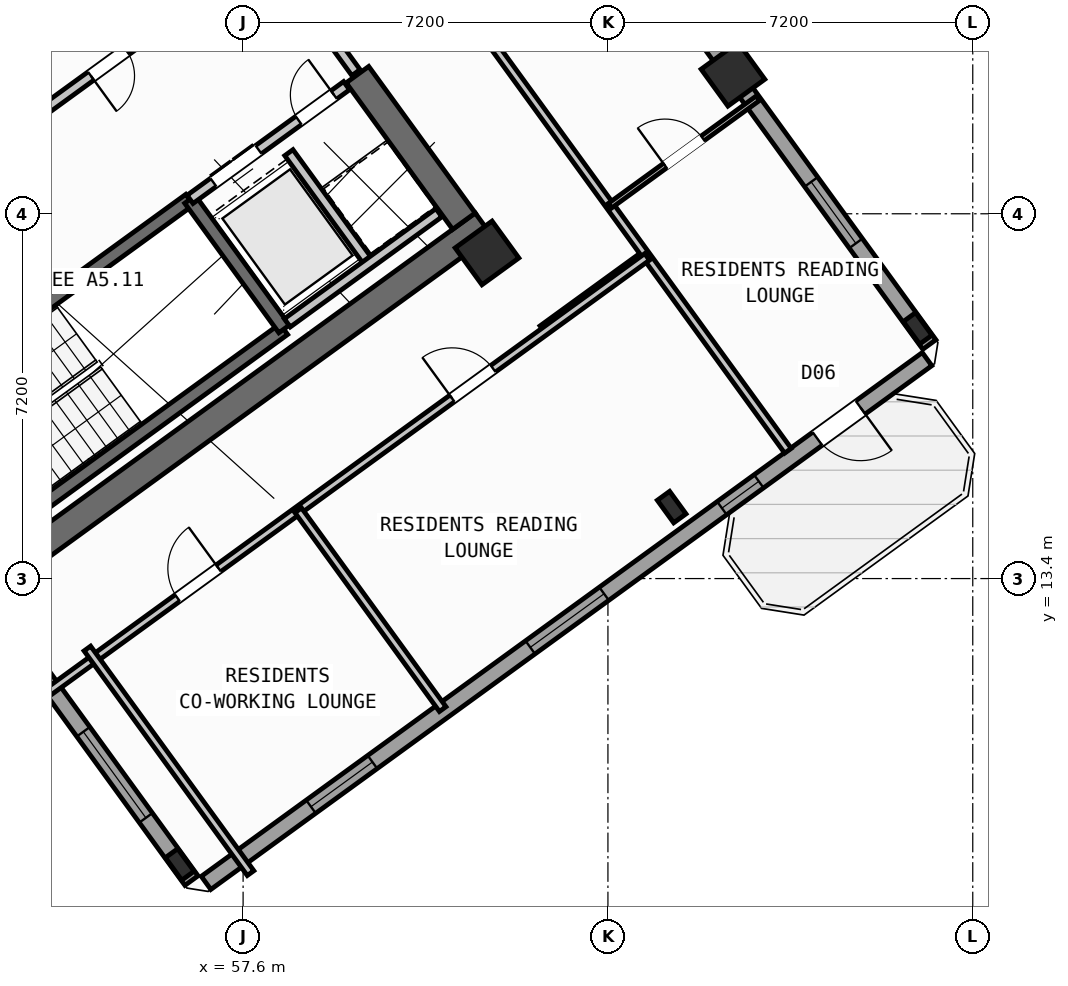
"""IFC4 building model, lengths in metres.
Left out: names, types, materials, properties, quantities, classifications, styles, units other than length and angle.
Written with IfcOpenShell. Run it as: python <this file> out.ifc"""

import sys

from ifc_helpers import new_model, si_unit, direction, frame, frame_2d, origin, origin_2d, place, context, subcontext, project, spatial, rectangle, hollow_rectangle, i_section, extrude, source, transform, mapped, element, fill, save


model = new_model("IFC4")
c1 = context("Model", 3, precision=1e-05, world=origin(), true_north=direction((0.0, 1.0)))
c2 = subcontext(c1, "Body", "Model", "MODEL_VIEW")
j1 = project(units=[si_unit("LENGTHUNIT", "METRE"), si_unit("PLANEANGLEUNIT", "RADIAN")], contexts=[c1])
p1 = place(None, origin())
s1 = spatial("IfcSite", under=j1, at=p1, CompositionType="ELEMENT")
p2 = place(p1, origin())
s2 = spatial("IfcBuilding", under=s1, at=p2, CompositionType="ELEMENT")
p3 = place(p2, frame((0.0, 0.0, 155.1)))
s3 = spatial("IfcBuildingStorey", under=s2, at=p3, CompositionType="ELEMENT", Elevation=155.1)
p4 = place(p3, frame((52.359, 13.14, 0.0), z_axis=(0.0, 0.0, 1.0), x_axis=(0.809014896919, 0.587788139183, 0.0)))
e1 = element("IfcWall", 1, at=p4, inside=s3, PredefinedType="SHEAR", context=c2, shape_type="SweptSolid", body=[
    extrude(rectangle(XDim=12.34, YDim=0.55, at=frame_2d((6.17, 0.0))), origin(), (0.0, 0.0, 1.0), 3.35),
])
p5 = place(p3, frame((61.958, 20.454, 0.0), z_axis=(0.0, 0.0, 1.0), x_axis=(-0.587802113096, 0.809004744015, 0.0)))
e2 = element("IfcWall", 2, at=p5, inside=s3, PredefinedType="SHEAR", context=c2, shape_type="SweptSolid", body=[
    extrude(rectangle(XDim=3.575, YDim=0.55, at=frame_2d((1.788, 0.0))), origin(), (0.0, 0.0, 1.0), 3.35),
])
m1 = source(origin(), c2, "Body", "SweptSolid", [
    extrude(i_section(OverallWidth=0.3, OverallDepth=0.55, WebThickness=0.015, FlangeThickness=0.029, at=origin_2d()), origin(), (0.0, 0.0, 1.0), 3.6),
])
for number, where, z_axis, x_axis in (
    (3, (56.35, 7.758, 0.0), (0.0, 0.0, 1.0), (0.809, 0.588, 0.0)),
    (4, (66.058, 14.811, 0.0), (0.0, 0.0, 1.0), (0.809, 0.588, 0.0)),
):
    element("IfcColumn", number, at=place(p3, frame(where, z_axis=z_axis, x_axis=x_axis)), inside=s3, PredefinedType="COLUMN", context=c2, shape_type="MappedRepresentation", body=[
        mapped(m1, transform((0.0, 0.0, 0.0), scale=1.0)),
    ])
m2 = source(origin(), c2, "Body", "SweptSolid", [
    extrude(hollow_rectangle(XDim=0.9, YDim=0.9, WallThickness=0.036, at=origin_2d()), origin(), (0.0, 0.0, 1.0), 3.6),
])
p6 = place(p3, frame((62.414, 19.827, 0.0), z_axis=(0.0, 0.0, 1.0), x_axis=(0.809016994375, 0.587785252292, 0.0)))
e5 = element("IfcColumn", 5, at=p6, inside=s3, PredefinedType="COLUMN", context=c2, shape_type="MappedRepresentation", body=[
    mapped(m2, transform((0.0, 0.0, 0.0), scale=1.0)),
])
p7 = place(p3, frame((70.912, 18.338, 0.0), z_axis=(0.0, 0.0, 1.0), x_axis=(0.809016994375, 0.587785252292, 0.0)))
e6 = element("IfcColumn", 6, at=p7, inside=s3, PredefinedType="COLUMN", context=c2, shape_type="MappedRepresentation", body=[
    mapped(m1, transform((0.0, 0.0, 0.0), scale=1.0)),
])
p8 = place(p3, frame((67.268, 23.354, 0.0), z_axis=(0.0, 0.0, 1.0), x_axis=(0.809016994375, 0.587785252292, 0.0)))
e7 = element("IfcColumn", 7, at=p8, inside=s3, PredefinedType="COLUMN", context=c2, shape_type="MappedRepresentation", body=[
    mapped(m2, transform((0.0, 0.0, 0.0), scale=1.0)),
])
p9 = place(p3, frame((58.455, 35.484, 0.0), z_axis=(0.0, 0.0, 1.0), x_axis=(0.587783625747, -0.809018176127, 0.0)))
e8 = element("IfcWall", 8, at=p9, inside=s3, PredefinedType="STANDARD", context=c2, shape_type="SweptSolid", body=[
    extrude(rectangle(XDim=21.587, YDim=0.32, at=frame_2d((10.794, 0.0))), origin(), (0.0, 0.0, 1.0), 2.775),
])
p10 = place(p9, frame((1.504, 0.0, 0.85)))
e9 = element("IfcOpeningElement", 9, at=p10, cuts=e8, PredefinedType="OPENING", context=c2, shape_type="SweptSolid", body=[
    extrude(rectangle(XDim=1.8, YDim=1.5, at=frame_2d((0.9, 0.75))), frame((0.0, 0.17, 0.0), z_axis=(0.0, -1.0, 0.0), x_axis=(1.0, 0.0, 0.0)), (0.0, 0.0, 1.0), 0.34),
])
p11 = place(p9, frame((10.444, 0.0, 0.85)))
e10 = element("IfcOpeningElement", 10, at=p11, cuts=e8, PredefinedType="OPENING", context=c2, shape_type="SweptSolid", body=[
    extrude(rectangle(XDim=1.8, YDim=1.5, at=frame_2d((0.9, 0.75))), frame((0.0, 0.17, 0.0), z_axis=(0.0, -1.0, 0.0), x_axis=(1.0, 0.0, 0.0)), (0.0, 0.0, 1.0), 0.34),
])
p12 = place(p9, frame((17.62, 0.0, 0.85)))
e11 = element("IfcOpeningElement", 11, at=p12, cuts=e8, PredefinedType="OPENING", context=c2, shape_type="SweptSolid", body=[
    extrude(rectangle(XDim=1.5, YDim=1.5, at=frame_2d((0.75, 0.75))), frame((0.0, 0.17, 0.0), z_axis=(0.0, -1.0, 0.0), x_axis=(1.0, 0.0, 0.0)), (0.0, 0.0, 1.0), 0.34),
])
p13 = place(p3, frame((71.098, 17.731, 0.0), z_axis=(0.0, 0.0, 1.0), x_axis=(-0.809021120468, -0.587779573171, 0.0)))
e12 = element("IfcWall", 12, at=p13, inside=s3, PredefinedType="STANDARD", context=c2, shape_type="SweptSolid", body=[
    extrude(rectangle(XDim=17.588, YDim=0.32, at=frame_2d((8.794, 0.0))), origin(), (0.0, 0.0, 1.0), 3.35),
])
p14 = place(p13, frame((1.624, 0.0, 0.0)))
e13 = element("IfcOpeningElement", 13, at=p14, cuts=e12, PredefinedType="OPENING", context=c2, shape_type="SweptSolid", body=[
    extrude(rectangle(XDim=1.05, YDim=2.15, at=frame_2d((0.525, 1.075))), frame((0.0, 0.17, 0.0), z_axis=(0.0, -1.0, 0.0), x_axis=(1.0, 0.0, 0.0)), (0.0, 0.0, 1.0), 0.34),
])
p15 = place(p13, frame((4.104, 0.0, 1.0)))
e14 = element("IfcOpeningElement", 14, at=p15, cuts=e12, PredefinedType="OPENING", context=c2, shape_type="SweptSolid", body=[
    extrude(rectangle(XDim=0.9, YDim=1.25, at=frame_2d((0.45, 0.625))), frame((0.0, 0.17, 0.0), z_axis=(0.0, -1.0, 0.0), x_axis=(1.0, 0.0, 0.0)), (0.0, 0.0, 1.0), 0.34),
])
p16 = place(p13, frame((7.879, 0.0, 0.85)))
e15 = element("IfcOpeningElement", 15, at=p16, cuts=e12, PredefinedType="OPENING", context=c2, shape_type="SweptSolid", body=[
    extrude(rectangle(XDim=1.8, YDim=1.5, at=frame_2d((0.9, 0.75))), frame((0.0, 0.17, 0.0), z_axis=(0.0, -1.0, 0.0), x_axis=(1.0, 0.0, 0.0)), (0.0, 0.0, 1.0), 0.34),
])
p17 = place(p13, frame((13.529, 0.0, 0.85)))
e16 = element("IfcOpeningElement", 16, at=p17, cuts=e12, PredefinedType="OPENING", context=c2, shape_type="SweptSolid", body=[
    extrude(rectangle(XDim=1.5, YDim=1.5, at=frame_2d((0.75, 0.75))), frame((0.0, 0.17, 0.0), z_axis=(0.0, -1.0, 0.0), x_axis=(1.0, 0.0, 0.0)), (0.0, 0.0, 1.0), 0.34),
])
p18 = place(p3, frame((56.581, 7.439, 0.0), z_axis=(0.0, 0.0, 1.0), x_axis=(-0.587771678454, 0.809026856172, 0.0)))
e17 = element("IfcWall", 17, at=p18, inside=s3, PredefinedType="STANDARD", context=c2, shape_type="SweptSolid", body=[
    extrude(rectangle(XDim=6.824, YDim=0.32, at=frame_2d((3.412, 0.0))), origin(), (0.0, 0.0, 1.0), 2.775),
])
p19 = place(p18, frame((1.531, 0.0, 0.8)))
e18 = element("IfcOpeningElement", 18, at=p19, cuts=e17, PredefinedType="OPENING", context=c2, shape_type="SweptSolid", body=[
    extrude(rectangle(XDim=2.1, YDim=1.55, at=frame_2d((1.05, 0.775))), frame((0.0, 0.17, 0.0), z_axis=(0.0, -1.0, 0.0), x_axis=(1.0, 0.0, 0.0)), (0.0, 0.0, 1.0), 0.34),
])
p20 = place(p3, frame((49.863, 23.44, 0.0), z_axis=(0.0, 0.0, 1.0), x_axis=(0.809003474932, 0.587803859759, 0.0)))
e19 = element("IfcWall", 19, at=p20, inside=s3, PredefinedType="SHEAR", context=c2, shape_type="SweptSolid", body=[
    extrude(rectangle(XDim=7.46, YDim=0.26, at=frame_2d((3.73, 0.0))), origin(), (0.0, 0.0, 1.0), 3.35),
])
p21 = place(p20, frame((0.36, 0.0, 0.0)))
e20 = element("IfcOpeningElement", 20, at=p21, cuts=e19, PredefinedType="OPENING", context=c2, shape_type="SweptSolid", body=[
    extrude(rectangle(XDim=0.86, YDim=2.05, at=frame_2d((0.43, 1.025))), frame((0.0, 0.14, 0.0), z_axis=(0.0, -1.0, 0.0), x_axis=(1.0, 0.0, 0.0)), (0.0, 0.0, 1.0), 0.28),
])
p22 = place(p3, frame((52.472, 14.013, 0.0), z_axis=(0.0, 0.0, 1.0), x_axis=(0.809028366311, 0.587769599847, 0.0)))
e21 = element("IfcWall", 21, at=p22, inside=s3, PredefinedType="SHEAR", context=c2, shape_type="SweptSolid", body=[
    extrude(rectangle(XDim=7.33, YDim=0.26, at=frame_2d((3.665, 0.0))), origin(), (0.0, 0.0, 1.0), 3.35),
])
p23 = place(p3, frame((50.615, 16.57, 0.0), z_axis=(0.0, 0.0, 1.0), x_axis=(0.809028366311, 0.587769599847, 0.0)))
e22 = element("IfcWall", 22, at=p23, inside=s3, PredefinedType="SHEAR", context=c2, shape_type="SweptSolid", body=[
    extrude(rectangle(XDim=7.33, YDim=0.26, at=frame_2d((3.665, 0.0))), origin(), (0.0, 0.0, 1.0), 3.35),
])
p24 = place(p23, frame((0.22, 0.0, 0.0)))
e23 = element("IfcOpeningElement", 23, at=p24, cuts=e22, PredefinedType="OPENING", context=c2, shape_type="SweptSolid", body=[
    extrude(rectangle(XDim=1.1, YDim=2.1, at=frame_2d((0.55, 1.05))), frame((0.0, 0.14, 0.0), z_axis=(0.0, -1.0, 0.0), x_axis=(1.0, 0.0, 0.0)), (0.0, 0.0, 1.0), 0.28),
])
p25 = place(p3, frame((58.41, 18.327, 0.0), z_axis=(0.0, 0.0, 1.0), x_axis=(-0.58776738483, 0.809029975545, 0.0)))
e24 = element("IfcWall", 24, at=p25, inside=s3, PredefinedType="SHEAR", context=c2, shape_type="SweptSolid", body=[
    extrude(rectangle(XDim=3.16, YDim=0.26, at=frame_2d((1.58, 0.0))), origin(), (0.0, 0.0, 1.0), 3.35),
])
p26 = place(p3, frame((56.553, 20.884, 0.0), z_axis=(0.0, 0.0, 1.0), x_axis=(0.809023564264, 0.58777620951, 0.0)))
e25 = element("IfcWall", 25, at=p26, inside=s3, PredefinedType="STANDARD", context=c2, shape_type="SweptSolid", body=[
    extrude(rectangle(XDim=3.818, YDim=0.2, at=frame_2d((1.909, 0.0))), origin(), (0.0, 0.0, 1.0), 3.34),
])
p27 = place(p26, frame((0.57, 0.0, 0.0)))
e26 = element("IfcOpeningElement", 26, at=p27, cuts=e25, PredefinedType="OPENING", context=c2, shape_type="SweptSolid", body=[
    extrude(rectangle(XDim=1.1, YDim=2.15, at=frame_2d((0.55, 1.075))), frame((0.0, 0.11, 0.0), z_axis=(0.0, -1.0, 0.0), x_axis=(1.0, 0.0, 0.0)), (0.0, 0.0, 1.0), 0.22),
])
p28 = place(p26, frame((2.65, 0.0, 0.0)))
e27 = element("IfcOpeningElement", 27, at=p28, cuts=e25, PredefinedType="OPENING", context=c2, shape_type="SweptSolid", body=[
    extrude(rectangle(XDim=0.86, YDim=2.05, at=frame_2d((0.43, 1.025))), frame((0.0, 0.11, 0.0), z_axis=(0.0, -1.0, 0.0), x_axis=(1.0, 0.0, 0.0)), (0.0, 0.0, 1.0), 0.22),
])
p29 = place(p3, frame((60.067, 19.655, 0.0), z_axis=(0.0, 0.0, 1.0), x_axis=(-0.587800520745, 0.809005900975, 0.0)))
e28 = element("IfcWall", 28, at=p29, inside=s3, PredefinedType="STANDARD", context=c2, shape_type="SweptSolid", body=[
    extrude(rectangle(XDim=2.66, YDim=0.2, at=frame_2d((1.33, 0.0))), origin(), (0.0, 0.0, 1.0), 3.34),
])
p30 = place(p3, frame((58.472, 18.447, 0.0), z_axis=(0.0, 0.0, 1.0), x_axis=(0.809018631237, 0.587782999339, 0.0)))
e29 = element("IfcWall", 29, at=p30, inside=s3, PredefinedType="STANDARD", context=c2, shape_type="SweptSolid", body=[
    extrude(rectangle(XDim=3.698, YDim=0.2, at=frame_2d((1.849, 0.0))), origin(), (0.0, 0.0, 1.0), 3.34),
])
p31 = place(p3, frame((53.425, 22.468, 0.0), z_axis=(0.0, 0.0, 1.0), x_axis=(0.809024377198, 0.587775090574, 0.0)))
e30 = element("IfcWall", 30, at=p31, inside=s3, PredefinedType="STANDARD", context=c2, shape_type="SweptSolid", body=[
    extrude(rectangle(XDim=5.418, YDim=0.2, at=frame_2d((2.709, 0.0))), origin(), (0.0, 0.0, 1.0), 3.34),
])
p32 = place(p31, frame((4.28, 0.0, 0.0)))
e31 = element("IfcOpeningElement", 31, at=p32, cuts=e30, PredefinedType="OPENING", context=c2, shape_type="SweptSolid", body=[
    extrude(rectangle(XDim=0.86, YDim=2.05, at=frame_2d((0.43, 1.025))), frame((0.0, 0.11, 0.0), z_axis=(0.0, -1.0, 0.0), x_axis=(1.0, 0.0, 0.0)), (0.0, 0.0, 1.0), 0.22),
])
p33 = place(p31, frame((1.45, 0.0, 0.0)))
e32 = element("IfcOpeningElement", 32, at=p33, cuts=e30, PredefinedType="OPENING", context=c2, shape_type="SweptSolid", body=[
    extrude(rectangle(XDim=0.86, YDim=2.05, at=frame_2d((0.43, 1.025))), frame((0.0, 0.11, 0.0), z_axis=(0.0, -1.0, 0.0), x_axis=(1.0, 0.0, 0.0)), (0.0, 0.0, 1.0), 0.22),
])
p34 = place(p3, frame((59.827, 23.386, 0.0), z_axis=(0.0, 0.0, 1.0), x_axis=(-0.587803840107, 0.809003489211, 0.0)))
e33 = element("IfcWall", 33, at=p34, inside=s3, PredefinedType="STANDARD", context=c2, shape_type="SweptSolid", body=[
    extrude(rectangle(XDim=2.96, YDim=0.2, at=frame_2d((1.48, 0.0))), origin(), (0.0, 0.0, 1.0), 3.34),
])
p35 = place(p34, frame((1.68, 0.0, 0.0)))
e34 = element("IfcOpeningElement", 34, at=p35, cuts=e33, PredefinedType="OPENING", context=c2, shape_type="SweptSolid", body=[
    extrude(rectangle(XDim=1.0, YDim=2.1, at=frame_2d((0.5, 1.05))), frame((0.0, 0.11, 0.0), z_axis=(0.0, -1.0, 0.0), x_axis=(1.0, 0.0, 0.0)), (0.0, 0.0, 1.0), 0.22),
])
p36 = place(p3, frame((63.507, 18.322, 0.0), z_axis=(0.0, 0.0, 1.0), x_axis=(0.809034604122, 0.587761013791, 0.0)))
e35 = element("IfcWall", 35, at=p36, inside=s3, PredefinedType="PARTITIONING", context=c2, shape_type="SweptSolid", body=[
    extrude(rectangle(XDim=2.51, YDim=0.16, at=frame_2d((1.255, 0.0))), origin(), (0.0, 0.0, 1.0), 3.34),
])
p37 = place(p3, frame((68.353, 15.922, 0.0), z_axis=(0.0, 0.0, 1.0), x_axis=(-0.587782002009, 0.809019355834, 0.0)))
e36 = element("IfcWall", 36, at=p37, inside=s3, PredefinedType="PARTITIONING", context=c2, shape_type="SweptSolid", body=[
    extrude(rectangle(XDim=15.35, YDim=0.16, at=frame_2d((7.675, 0.0))), origin(), (0.0, 0.0, 1.0), 3.34),
])
p38 = place(p3, frame((64.839, 20.759, 0.0), z_axis=(0.0, 0.0, 1.0), x_axis=(0.809013833588, 0.587789602718, 0.0)))
e37 = element("IfcWall", 37, at=p38, inside=s3, PredefinedType="PARTITIONING", context=c2, shape_type="SweptSolid", body=[
    extrude(rectangle(XDim=3.61, YDim=0.11, at=frame_2d((1.805, 0.0))), origin(), (0.0, 0.0, 1.0), 3.34),
])
p39 = place(p38, frame((1.345, 0.0, 0.0)))
e38 = element("IfcOpeningElement", 38, at=p39, cuts=e37, PredefinedType="OPENING", context=c2, shape_type="SweptSolid", body=[
    extrude(rectangle(XDim=0.92, YDim=2.08, at=frame_2d((0.46, 1.04))), frame((0.0, 0.065, 0.0), z_axis=(0.0, -1.0, 0.0), x_axis=(1.0, 0.0, 0.0)), (0.0, 0.0, 1.0), 0.13),
])
p40 = place(p3, frame((53.705, 11.126, 0.0), z_axis=(0.0, 0.0, 1.0), x_axis=(0.809014504436, 0.587788679384, 0.0)))
e39 = element("IfcWall", 39, at=p40, inside=s3, PredefinedType="PARTITIONING", context=c2, shape_type="SweptSolid", body=[
    extrude(rectangle(XDim=14.67, YDim=0.16, at=frame_2d((7.335, 0.0))), origin(), (0.0, 0.0, 1.0), 3.34),
])
p41 = place(p40, frame((3.215, 0.0, 0.0)))
e40 = element("IfcOpeningElement", 40, at=p41, cuts=e39, PredefinedType="OPENING", context=c2, shape_type="SweptSolid", body=[
    extrude(rectangle(XDim=1.0, YDim=2.1, at=frame_2d((0.5, 1.05))), frame((0.0, 0.09, 0.0), z_axis=(0.0, -1.0, 0.0), x_axis=(1.0, 0.0, 0.0)), (0.0, 0.0, 1.0), 0.18),
])
p42 = place(p40, frame((9.915, 0.0, 0.0)))
e41 = element("IfcOpeningElement", 41, at=p42, cuts=e39, PredefinedType="OPENING", context=c2, shape_type="SweptSolid", body=[
    extrude(rectangle(XDim=1.0, YDim=2.1, at=frame_2d((0.5, 1.05))), frame((0.0, 0.09, 0.0), z_axis=(0.0, -1.0, 0.0), x_axis=(1.0, 0.0, 0.0)), (0.0, 0.0, 1.0), 0.18),
])
p43 = place(p3, frame((57.747, 7.586, 0.0), z_axis=(0.0, 0.0, 1.0), x_axis=(-0.587784893399, 0.809017255126, 0.0)))
e42 = element("IfcWall", 42, at=p43, inside=s3, PredefinedType="PARTITIONING", context=c2, shape_type="SweptSolid", body=[
    extrude(rectangle(XDim=5.48, YDim=0.16, at=frame_2d((2.74, 0.0))), origin(), (0.0, 0.0, 1.0), 3.34),
])
p44 = place(p3, frame((61.539, 10.823, 0.0), z_axis=(0.0, 0.0, 1.0), x_axis=(-0.587785532001, 0.809016791155, 0.0)))
e43 = element("IfcWall", 43, at=p44, inside=s3, PredefinedType="PARTITIONING", context=c2, shape_type="SweptSolid", body=[
    extrude(rectangle(XDim=4.85, YDim=0.16, at=frame_2d((2.425, 0.0))), origin(), (0.0, 0.0, 1.0), 3.34),
])
m3 = source(origin(), c2, "Body", "SweptSolid", [
    extrude(rectangle(XDim=1.05, YDim=2.15, at=frame_2d((0.525, 1.075))), frame((0.0, 0.025, 0.0), z_axis=(0.0, -1.0, 0.0), x_axis=(1.0, 0.0, 0.0)), (0.0, 0.0, 1.0), 0.05),
])
p45 = place(p14, origin())
e44 = element("IfcDoor", 44, at=p45, inside=s3, OperationType="SINGLE_SWING_LEFT", PredefinedType="DOOR", context=c2, shape_type="MappedRepresentation", body=[
    mapped(m3, transform((0.0, 0.0, 0.0), scale=1.0)),
])
fill(e13, e44)
m4 = source(origin(), c2, "Body", "SweptSolid", [
    extrude(rectangle(XDim=1.5, YDim=1.5, at=frame_2d((0.75, 0.75))), frame((0.0, 0.03, 0.0), z_axis=(0.0, -1.0, 0.0), x_axis=(1.0, 0.0, 0.0)), (0.0, 0.0, 1.0), 0.06),
])
p46 = place(p12, origin())
e45 = element("IfcWindow", 45, at=p46, inside=s3, PartitioningType="SINGLE_PANEL", PredefinedType="WINDOW", context=c2, shape_type="MappedRepresentation", body=[
    mapped(m4, transform((0.0, 0.0, 0.0), scale=1.0)),
])
fill(e11, e45)
m5 = source(origin(), c2, "Body", "SweptSolid", [
    extrude(rectangle(XDim=0.9, YDim=1.25, at=frame_2d((0.45, 0.625))), frame((0.0, 0.03, 0.0), z_axis=(0.0, -1.0, 0.0), x_axis=(1.0, 0.0, 0.0)), (0.0, 0.0, 1.0), 0.06),
])
p47 = place(p15, origin())
e46 = element("IfcWindow", 46, at=p47, inside=s3, PartitioningType="SINGLE_PANEL", PredefinedType="WINDOW", context=c2, shape_type="MappedRepresentation", body=[
    mapped(m5, transform((0.0, 0.0, 0.0), scale=1.0)),
])
fill(e14, e46)
m6 = source(origin(), c2, "Body", "SweptSolid", [
    extrude(rectangle(XDim=1.8, YDim=1.5, at=frame_2d((0.9, 0.75))), frame((0.0, 0.03, 0.0), z_axis=(0.0, -1.0, 0.0), x_axis=(1.0, 0.0, 0.0)), (0.0, 0.0, 1.0), 0.06),
])
p48 = place(p16, origin())
e47 = element("IfcWindow", 47, at=p48, inside=s3, PartitioningType="SINGLE_PANEL", PredefinedType="WINDOW", context=c2, shape_type="MappedRepresentation", body=[
    mapped(m6, transform((0.0, 0.0, 0.0), scale=1.0)),
])
fill(e15, e47)
p49 = place(p17, origin())
e48 = element("IfcWindow", 48, at=p49, inside=s3, PartitioningType="SINGLE_PANEL", PredefinedType="WINDOW", context=c2, shape_type="MappedRepresentation", body=[
    mapped(m4, transform((0.0, 0.0, 0.0), scale=1.0)),
])
fill(e16, e48)
m7 = source(origin(), c2, "Body", "SweptSolid", [
    extrude(rectangle(XDim=2.1, YDim=1.55, at=frame_2d((1.05, 0.775))), frame((0.0, 0.03, 0.0), z_axis=(0.0, -1.0, 0.0), x_axis=(1.0, 0.0, 0.0)), (0.0, 0.0, 1.0), 0.06),
])
p50 = place(p19, origin())
e49 = element("IfcWindow", 49, at=p50, inside=s3, PartitioningType="SINGLE_PANEL", PredefinedType="WINDOW", context=c2, shape_type="MappedRepresentation", body=[
    mapped(m7, transform((0.0, 0.0, 0.0), scale=1.0)),
])
fill(e18, e49)
m8 = source(origin(), c2, "Body", "SweptSolid", [
    extrude(rectangle(XDim=1.1, YDim=2.15, at=frame_2d((0.55, 1.075))), frame((0.0, 0.025, 0.0), z_axis=(0.0, -1.0, 0.0), x_axis=(1.0, 0.0, 0.0)), (0.0, 0.0, 1.0), 0.05),
])
p51 = place(p27, origin())
e50 = element("IfcDoor", 50, at=p51, inside=s3, OperationType="DOUBLE_DOOR_SLIDING", PredefinedType="DOOR", context=c2, shape_type="MappedRepresentation", body=[
    mapped(m8, transform((0.0, 0.0, 0.0), scale=1.0)),
])
fill(e26, e50)
m9 = source(origin(), c2, "Body", "SweptSolid", [
    extrude(rectangle(XDim=0.86, YDim=2.05, at=frame_2d((0.43, 1.025))), frame((0.0, 0.025, 0.0), z_axis=(0.0, -1.0, 0.0), x_axis=(1.0, 0.0, 0.0)), (0.0, 0.0, 1.0), 0.05),
])
p52 = place(p28, origin())
e51 = element("IfcDoor", 51, at=p52, inside=s3, OperationType="SINGLE_SWING_RIGHT", PredefinedType="DOOR", context=c2, shape_type="MappedRepresentation", body=[
    mapped(m9, transform((0.0, 0.0, 0.0), scale=1.0)),
])
fill(e27, e51)
p53 = place(p33, frame((0.86, 0.0, 0.0), z_axis=(0.0, 0.0, 1.0), x_axis=(-1.0, 0.0, 0.0)))
e52 = element("IfcDoor", 52, at=p53, inside=s3, OperationType="SINGLE_SWING_RIGHT", PredefinedType="DOOR", context=c2, shape_type="MappedRepresentation", body=[
    mapped(m9, transform((0.0, 0.0, 0.0), scale=1.0)),
])
fill(e32, e52)
m10 = source(origin(), c2, "Body", "SweptSolid", [
    extrude(rectangle(XDim=0.92, YDim=2.08, at=frame_2d((0.46, 1.04))), frame((0.0, 0.025, 0.0), z_axis=(0.0, -1.0, 0.0), x_axis=(1.0, 0.0, 0.0)), (0.0, 0.0, 1.0), 0.05),
])
p54 = place(p39, origin())
e53 = element("IfcDoor", 53, at=p54, inside=s3, OperationType="SINGLE_SWING_LEFT", PredefinedType="DOOR", context=c2, shape_type="MappedRepresentation", body=[
    mapped(m10, transform((0.0, 0.0, 0.0), scale=1.0)),
])
fill(e38, e53)
m11 = source(origin(), c2, "Body", "SweptSolid", [
    extrude(rectangle(XDim=1.0, YDim=2.1, at=frame_2d((0.5, 1.05))), frame((0.0, 0.025, 0.0), z_axis=(0.0, -1.0, 0.0), x_axis=(1.0, 0.0, 0.0)), (0.0, 0.0, 1.0), 0.05),
])
p55 = place(p41, origin())
e54 = element("IfcDoor", 54, at=p55, inside=s3, OperationType="SINGLE_SWING_RIGHT", PredefinedType="DOOR", context=c2, shape_type="MappedRepresentation", body=[
    mapped(m11, transform((0.0, 0.0, 0.0), scale=1.0)),
])
fill(e40, e54)
p56 = place(p42, origin())
e55 = element("IfcDoor", 55, at=p56, inside=s3, OperationType="SINGLE_SWING_LEFT", PredefinedType="DOOR", context=c2, shape_type="MappedRepresentation", body=[
    mapped(m11, transform((0.0, 0.0, 0.0), scale=1.0)),
])
fill(e41, e55)
save(model, sys.argv[1])
